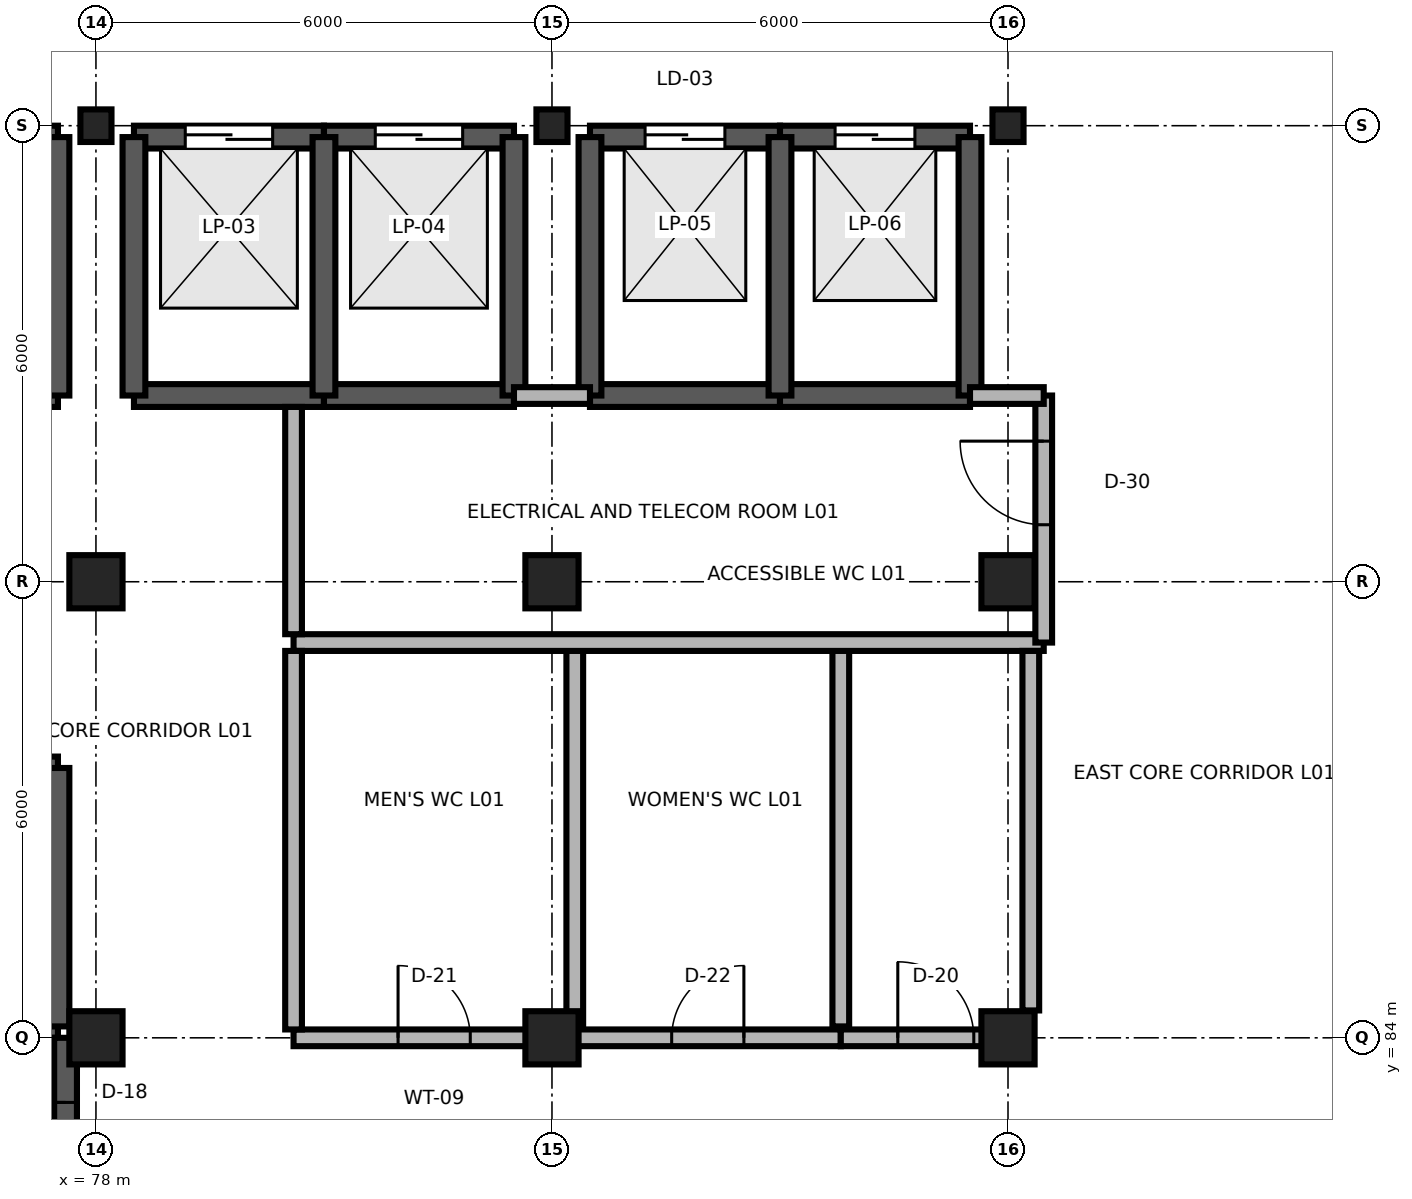
"""IFC4 building model, lengths in metres.
Left out: names, types, materials, properties, quantities, classifications, styles, units other than length and angle.
Written with IfcOpenShell. Run it as: python <this file> out.ifc"""

import sys

from ifc_helpers import new_model, si_unit, direction, frame, frame_2d, origin, origin_2d, place, context, subcontext, project, spatial, rectangle, i_section, extrude, element, fill, save


model = new_model("IFC4")
c1 = context("Model", 3, precision=1e-05, world=origin(), true_north=direction((0.0, 1.0)))
c2 = subcontext(c1, "Body", "Model", "MODEL_VIEW")
j1 = project(units=[si_unit("LENGTHUNIT", "METRE"), si_unit("PLANEANGLEUNIT", "RADIAN")], contexts=[c1])
p1 = place(None, origin())
s1 = spatial("IfcSite", under=j1, at=p1, CompositionType="ELEMENT")
p2 = place(p1, origin())
s2 = spatial("IfcBuilding", under=s1, at=p2, CompositionType="ELEMENT")
p3 = place(p2, origin())
s3 = spatial("IfcBuildingStorey", under=s2, at=p3, CompositionType="ELEMENT", Elevation=0.0)
for number, where, z_axis, x_axis in (
    (1, (78.0, 84.0, 0.0), (0.0, 0.0, 1.0), (1.0, 0.0, 0.0)),
    (2, (84.0, 84.0, 0.0), (0.0, 0.0, 1.0), (1.0, 0.0, 0.0)),
    (3, (90.0, 84.0, 0.0), (0.0, 0.0, 1.0), (1.0, 0.0, 0.0)),
    (4, (78.0, 90.0, 0.0), (0.0, 0.0, 1.0), (1.0, 0.0, 0.0)),
    (5, (84.0, 90.0, 0.0), (0.0, 0.0, 1.0), (1.0, 0.0, 0.0)),
    (6, (90.0, 90.0, 0.0), (0.0, 0.0, 1.0), (1.0, 0.0, 0.0)),
):
    element("IfcColumn", number, at=place(p3, frame(where, z_axis=z_axis, x_axis=x_axis)), inside=s3, PredefinedType="COLUMN", context=c2, shape_type="SweptSolid", body=[
        extrude(rectangle(XDim=0.7, YDim=0.7, at=origin_2d()), origin(), (0.0, 0.0, 1.0), 6.0),
    ])
for number, where, z_axis, x_axis in (
    (7, (78.0, 96.0, 0.0), (0.0, 0.0, 1.0), (1.0, 0.0, 0.0)),
    (8, (84.0, 96.0, 0.0), (0.0, 0.0, 1.0), (1.0, 0.0, 0.0)),
    (9, (90.0, 96.0, 0.0), (0.0, 0.0, 1.0), (1.0, 0.0, 0.0)),
):
    element("IfcColumn", number, at=place(p3, frame(where, z_axis=z_axis, x_axis=x_axis)), inside=s3, PredefinedType="COLUMN", context=c2, shape_type="SweptSolid", body=[
        extrude(i_section(OverallWidth=0.409, OverallDepth=0.429, WebThickness=0.024, FlangeThickness=0.035, FilletRadius=0.022, at=origin_2d()), origin(), (0.0, 0.0, 1.0), 6.0),
    ])
p4 = place(p3, frame((75.0, 84.15, 0.0), z_axis=(0.0, 0.0, 1.0), x_axis=(1.0, 0.0, 0.0)))
e10 = element("IfcWall", 10, at=p4, inside=s3, PredefinedType="SHEAR", context=c2, shape_type="SweptSolid", body=[
    extrude(rectangle(XDim=2.5, YDim=0.3, at=frame_2d((1.25, 0.0))), origin(), (0.0, 0.0, 1.0), 5.76),
])
p5 = place(p4, frame((0.7, 0.0, 0.0)))
e11 = element("IfcOpeningElement", 11, at=p5, cuts=e10, PredefinedType="OPENING", context=c2, shape_type="SweptSolid", body=[
    extrude(rectangle(XDim=1.1, YDim=2.1, at=frame_2d((0.55, 1.05))), frame((0.0, 0.165, 0.0), z_axis=(0.0, -1.0, 0.0), x_axis=(1.0, 0.0, 0.0)), (0.0, 0.0, 1.0), 0.33),
])
p6 = place(p3, frame((75.0, 87.55, 0.0), z_axis=(0.0, 0.0, 1.0), x_axis=(1.0, 0.0, 0.0)))
e12 = element("IfcWall", 12, at=p6, inside=s3, PredefinedType="SHEAR", context=c2, shape_type="SweptSolid", body=[
    extrude(rectangle(XDim=2.5, YDim=0.3, at=frame_2d((1.25, 0.0))), origin(), (0.0, 0.0, 1.0), 5.76),
])
p7 = place(p3, frame((77.5, 84.15, 0.0), z_axis=(0.0, 0.0, 1.0), x_axis=(0.0, 1.0, 0.0)))
e13 = element("IfcWall", 13, at=p7, inside=s3, PredefinedType="SHEAR", context=c2, shape_type="SweptSolid", body=[
    extrude(rectangle(XDim=3.4, YDim=0.3, at=frame_2d((1.7, 0.0))), origin(), (0.0, 0.0, 1.0), 5.76),
])
p8 = place(p3, frame((75.0, 95.85, 0.0), z_axis=(0.0, 0.0, 1.0), x_axis=(1.0, 0.0, 0.0)))
e14 = element("IfcWall", 14, at=p8, inside=s3, PredefinedType="SHEAR", context=c2, shape_type="SweptSolid", body=[
    extrude(rectangle(XDim=2.5, YDim=0.3, at=frame_2d((1.25, 0.0))), origin(), (0.0, 0.0, 1.0), 5.76),
])
p9 = place(p8, frame((0.675, 0.0, 0.0)))
e15 = element("IfcOpeningElement", 15, at=p9, cuts=e14, PredefinedType="OPENING", context=c2, shape_type="SweptSolid", body=[
    extrude(rectangle(XDim=1.15, YDim=2.15, at=frame_2d((0.575, 1.075))), frame((0.0, 0.165, 0.0), z_axis=(0.0, -1.0, 0.0), x_axis=(1.0, 0.0, 0.0)), (0.0, 0.0, 1.0), 0.33),
])
p10 = place(p3, frame((75.0, 92.45, 0.0), z_axis=(0.0, 0.0, 1.0), x_axis=(1.0, 0.0, 0.0)))
e16 = element("IfcWall", 16, at=p10, inside=s3, PredefinedType="SHEAR", context=c2, shape_type="SweptSolid", body=[
    extrude(rectangle(XDim=2.5, YDim=0.3, at=frame_2d((1.25, 0.0))), origin(), (0.0, 0.0, 1.0), 5.76),
])
p11 = place(p3, frame((77.5, 92.45, 0.0), z_axis=(0.0, 0.0, 1.0), x_axis=(0.0, 1.0, 0.0)))
e17 = element("IfcWall", 17, at=p11, inside=s3, PredefinedType="SHEAR", context=c2, shape_type="SweptSolid", body=[
    extrude(rectangle(XDim=3.4, YDim=0.3, at=frame_2d((1.7, 0.0))), origin(), (0.0, 0.0, 1.0), 5.76),
])
p12 = place(p3, frame((78.5, 95.85, 0.0), z_axis=(0.0, 0.0, 1.0), x_axis=(1.0, 0.0, 0.0)))
e18 = element("IfcWall", 18, at=p12, inside=s3, PredefinedType="SHEAR", context=c2, shape_type="SweptSolid", body=[
    extrude(rectangle(XDim=2.5, YDim=0.3, at=frame_2d((1.25, 0.0))), origin(), (0.0, 0.0, 1.0), 5.76),
])
p13 = place(p12, frame((0.675, 0.0, 0.0)))
e19 = element("IfcOpeningElement", 19, at=p13, cuts=e18, PredefinedType="OPENING", context=c2, shape_type="SweptSolid", body=[
    extrude(rectangle(XDim=1.15, YDim=2.15, at=frame_2d((0.575, 1.075))), frame((0.0, 0.165, 0.0), z_axis=(0.0, -1.0, 0.0), x_axis=(1.0, 0.0, 0.0)), (0.0, 0.0, 1.0), 0.33),
])
p14 = place(p3, frame((78.5, 92.45, 0.0), z_axis=(0.0, 0.0, 1.0), x_axis=(1.0, 0.0, 0.0)))
e20 = element("IfcWall", 20, at=p14, inside=s3, PredefinedType="SHEAR", context=c2, shape_type="SweptSolid", body=[
    extrude(rectangle(XDim=2.5, YDim=0.3, at=frame_2d((1.25, 0.0))), origin(), (0.0, 0.0, 1.0), 5.76),
])
p15 = place(p3, frame((78.5, 92.45, 0.0), z_axis=(0.0, 0.0, 1.0), x_axis=(0.0, 1.0, 0.0)))
e21 = element("IfcWall", 21, at=p15, inside=s3, PredefinedType="SHEAR", context=c2, shape_type="SweptSolid", body=[
    extrude(rectangle(XDim=3.4, YDim=0.3, at=frame_2d((1.7, 0.0))), origin(), (0.0, 0.0, 1.0), 5.76),
])
p16 = place(p3, frame((81.0, 95.85, 0.0), z_axis=(0.0, 0.0, 1.0), x_axis=(1.0, 0.0, 0.0)))
e22 = element("IfcWall", 22, at=p16, inside=s3, PredefinedType="SHEAR", context=c2, shape_type="SweptSolid", body=[
    extrude(rectangle(XDim=2.5, YDim=0.3, at=frame_2d((1.25, 0.0))), origin(), (0.0, 0.0, 1.0), 5.76),
])
p17 = place(p16, frame((0.675, 0.0, 0.0)))
e23 = element("IfcOpeningElement", 23, at=p17, cuts=e22, PredefinedType="OPENING", context=c2, shape_type="SweptSolid", body=[
    extrude(rectangle(XDim=1.15, YDim=2.15, at=frame_2d((0.575, 1.075))), frame((0.0, 0.165, 0.0), z_axis=(0.0, -1.0, 0.0), x_axis=(1.0, 0.0, 0.0)), (0.0, 0.0, 1.0), 0.33),
])
p18 = place(p3, frame((81.0, 92.45, 0.0), z_axis=(0.0, 0.0, 1.0), x_axis=(1.0, 0.0, 0.0)))
e24 = element("IfcWall", 24, at=p18, inside=s3, PredefinedType="SHEAR", context=c2, shape_type="SweptSolid", body=[
    extrude(rectangle(XDim=2.5, YDim=0.3, at=frame_2d((1.25, 0.0))), origin(), (0.0, 0.0, 1.0), 5.76),
])
for number, where, z_axis, x_axis in (
    (25, (81.0, 92.45, 0.0), (0.0, 0.0, 1.0), (0.0, 1.0, 0.0)),
    (26, (83.5, 92.45, 0.0), (0.0, 0.0, 1.0), (0.0, 1.0, 0.0)),
):
    element("IfcWall", number, at=place(p3, frame(where, z_axis=z_axis, x_axis=x_axis)), inside=s3, PredefinedType="SHEAR", context=c2, shape_type="SweptSolid", body=[
        extrude(rectangle(XDim=3.4, YDim=0.3, at=frame_2d((1.7, 0.0))), origin(), (0.0, 0.0, 1.0), 5.76),
    ])
p19 = place(p3, frame((84.5, 95.85, 0.0), z_axis=(0.0, 0.0, 1.0), x_axis=(1.0, 0.0, 0.0)))
e27 = element("IfcWall", 27, at=p19, inside=s3, PredefinedType="SHEAR", context=c2, shape_type="SweptSolid", body=[
    extrude(rectangle(XDim=2.5, YDim=0.3, at=frame_2d((1.25, 0.0))), origin(), (0.0, 0.0, 1.0), 5.76),
])
p20 = place(p19, frame((0.725, 0.0, 0.0)))
e28 = element("IfcOpeningElement", 28, at=p20, cuts=e27, PredefinedType="OPENING", context=c2, shape_type="SweptSolid", body=[
    extrude(rectangle(XDim=1.05, YDim=2.1, at=frame_2d((0.525, 1.05))), frame((0.0, 0.165, 0.0), z_axis=(0.0, -1.0, 0.0), x_axis=(1.0, 0.0, 0.0)), (0.0, 0.0, 1.0), 0.33),
])
p21 = place(p3, frame((84.5, 92.45, 0.0), z_axis=(0.0, 0.0, 1.0), x_axis=(1.0, 0.0, 0.0)))
e29 = element("IfcWall", 29, at=p21, inside=s3, PredefinedType="SHEAR", context=c2, shape_type="SweptSolid", body=[
    extrude(rectangle(XDim=2.5, YDim=0.3, at=frame_2d((1.25, 0.0))), origin(), (0.0, 0.0, 1.0), 5.76),
])
p22 = place(p3, frame((84.5, 92.45, 0.0), z_axis=(0.0, 0.0, 1.0), x_axis=(0.0, 1.0, 0.0)))
e30 = element("IfcWall", 30, at=p22, inside=s3, PredefinedType="SHEAR", context=c2, shape_type="SweptSolid", body=[
    extrude(rectangle(XDim=3.4, YDim=0.3, at=frame_2d((1.7, 0.0))), origin(), (0.0, 0.0, 1.0), 5.76),
])
p23 = place(p3, frame((87.0, 95.85, 0.0), z_axis=(0.0, 0.0, 1.0), x_axis=(1.0, 0.0, 0.0)))
e31 = element("IfcWall", 31, at=p23, inside=s3, PredefinedType="SHEAR", context=c2, shape_type="SweptSolid", body=[
    extrude(rectangle(XDim=2.5, YDim=0.3, at=frame_2d((1.25, 0.0))), origin(), (0.0, 0.0, 1.0), 5.76),
])
p24 = place(p23, frame((0.725, 0.0, 0.0)))
e32 = element("IfcOpeningElement", 32, at=p24, cuts=e31, PredefinedType="OPENING", context=c2, shape_type="SweptSolid", body=[
    extrude(rectangle(XDim=1.05, YDim=2.1, at=frame_2d((0.525, 1.05))), frame((0.0, 0.165, 0.0), z_axis=(0.0, -1.0, 0.0), x_axis=(1.0, 0.0, 0.0)), (0.0, 0.0, 1.0), 0.33),
])
p25 = place(p3, frame((87.0, 92.45, 0.0), z_axis=(0.0, 0.0, 1.0), x_axis=(1.0, 0.0, 0.0)))
e33 = element("IfcWall", 33, at=p25, inside=s3, PredefinedType="SHEAR", context=c2, shape_type="SweptSolid", body=[
    extrude(rectangle(XDim=2.5, YDim=0.3, at=frame_2d((1.25, 0.0))), origin(), (0.0, 0.0, 1.0), 5.76),
])
for number, where, z_axis, x_axis in (
    (34, (87.0, 92.45, 0.0), (0.0, 0.0, 1.0), (0.0, 1.0, 0.0)),
    (35, (89.5, 92.45, 0.0), (0.0, 0.0, 1.0), (0.0, 1.0, 0.0)),
):
    element("IfcWall", number, at=place(p3, frame(where, z_axis=z_axis, x_axis=x_axis)), inside=s3, PredefinedType="SHEAR", context=c2, shape_type="SweptSolid", body=[
        extrude(rectangle(XDim=3.4, YDim=0.3, at=frame_2d((1.7, 0.0))), origin(), (0.0, 0.0, 1.0), 5.76),
    ])
p26 = place(p3, frame((77.6, 81.0, 0.0), z_axis=(0.0, 0.0, 1.0), x_axis=(0.0, 1.0, 0.0)))
e36 = element("IfcWall", 36, at=p26, inside=s3, PredefinedType="SHEAR", context=c2, shape_type="SweptSolid", body=[
    extrude(rectangle(XDim=3.0, YDim=0.3, at=frame_2d((1.5, 0.0))), origin(), (0.0, 0.0, 1.0), 5.76),
])
p27 = place(p26, frame((0.85, 0.0, 0.0)))
e37 = element("IfcOpeningElement", 37, at=p27, cuts=e36, PredefinedType="OPENING", context=c2, shape_type="SweptSolid", body=[
    extrude(rectangle(XDim=1.3, YDim=2.2, at=frame_2d((0.65, 1.1))), frame((0.0, 0.165, 0.0), z_axis=(0.0, -1.0, 0.0), x_axis=(1.0, 0.0, 0.0)), (0.0, 0.0, 1.0), 0.33),
])
p28 = place(p3, frame((80.6, 84.0, 0.0), z_axis=(0.0, 0.0, 1.0), x_axis=(1.0, 0.0, 0.0)))
e38 = element("IfcWall", 38, at=p28, inside=s3, PredefinedType="PARTITIONING", context=c2, shape_type="SweptSolid", body=[
    extrude(rectangle(XDim=3.7, YDim=0.22, at=frame_2d((1.85, 0.0))), origin(), (0.0, 0.0, 1.0), 5.32),
])
p29 = place(p28, frame((1.375, 0.0, 0.0)))
e39 = element("IfcOpeningElement", 39, at=p29, cuts=e38, PredefinedType="OPENING", context=c2, shape_type="SweptSolid", body=[
    extrude(rectangle(XDim=0.95, YDim=2.15, at=frame_2d((0.475, 1.075))), frame((0.0, 0.125, 0.0), z_axis=(0.0, -1.0, 0.0), x_axis=(1.0, 0.0, 0.0)), (0.0, 0.0, 1.0), 0.25),
])
p30 = place(p3, frame((84.3, 84.0, 0.0), z_axis=(0.0, 0.0, 1.0), x_axis=(1.0, 0.0, 0.0)))
e40 = element("IfcWall", 40, at=p30, inside=s3, PredefinedType="PARTITIONING", context=c2, shape_type="SweptSolid", body=[
    extrude(rectangle(XDim=3.5, YDim=0.22, at=frame_2d((1.75, 0.0))), origin(), (0.0, 0.0, 1.0), 5.32),
])
p31 = place(p30, frame((1.275, 0.0, 0.0)))
e41 = element("IfcOpeningElement", 41, at=p31, cuts=e40, PredefinedType="OPENING", context=c2, shape_type="SweptSolid", body=[
    extrude(rectangle(XDim=0.95, YDim=2.1, at=frame_2d((0.475, 1.05))), frame((0.0, 0.125, 0.0), z_axis=(0.0, -1.0, 0.0), x_axis=(1.0, 0.0, 0.0)), (0.0, 0.0, 1.0), 0.25),
])
p32 = place(p3, frame((87.8, 84.0, 0.0), z_axis=(0.0, 0.0, 1.0), x_axis=(1.0, 0.0, 0.0)))
e42 = element("IfcWall", 42, at=p32, inside=s3, PredefinedType="PARTITIONING", context=c2, shape_type="SweptSolid", body=[
    extrude(rectangle(XDim=2.5, YDim=0.22, at=frame_2d((1.25, 0.0))), origin(), (0.0, 0.0, 1.0), 5.32),
])
p33 = place(p32, frame((0.75, 0.0, 0.0)))
e43 = element("IfcOpeningElement", 43, at=p33, cuts=e42, PredefinedType="OPENING", context=c2, shape_type="SweptSolid", body=[
    extrude(rectangle(XDim=1.0, YDim=2.15, at=frame_2d((0.5, 1.075))), frame((0.0, 0.125, 0.0), z_axis=(0.0, -1.0, 0.0), x_axis=(1.0, 0.0, 0.0)), (0.0, 0.0, 1.0), 0.25),
])
for number, where, z_axis, x_axis in (
    (44, (84.3, 84.15, 0.0), (0.0, 0.0, 1.0), (0.0, 1.0, 0.0)),
    (45, (87.8, 84.15, 0.0), (0.0, 0.0, 1.0), (0.0, 1.0, 0.0)),
):
    element("IfcWall", number, at=place(p3, frame(where, z_axis=z_axis, x_axis=x_axis)), inside=s3, PredefinedType="PARTITIONING", context=c2, shape_type="SweptSolid", body=[
        extrude(rectangle(XDim=5.0, YDim=0.22, at=frame_2d((2.5, 0.0))), origin(), (0.0, 0.0, 1.0), 5.76),
    ])
p34 = place(p3, frame((80.6, 89.2, 0.0), z_axis=(0.0, 0.0, 1.0), x_axis=(1.0, 0.0, 0.0)))
e46 = element("IfcWall", 46, at=p34, inside=s3, PredefinedType="PARTITIONING", context=c2, shape_type="SweptSolid", body=[
    extrude(rectangle(XDim=9.87, YDim=0.22, at=frame_2d((4.935, 0.0))), origin(), (0.0, 0.0, 1.0), 5.76),
])
p35 = place(p3, frame((90.47, 89.2, 0.0), z_axis=(0.0, 0.0, 1.0), x_axis=(0.0, 1.0, 0.0)))
e47 = element("IfcWall", 47, at=p35, inside=s3, PredefinedType="PARTITIONING", context=c2, shape_type="SweptSolid", body=[
    extrude(rectangle(XDim=3.25, YDim=0.22, at=frame_2d((1.625, 0.0))), origin(), (0.0, 0.0, 1.0), 5.76),
])
p36 = place(p35, frame((1.55, 0.0, 0.0)))
e48 = element("IfcOpeningElement", 48, at=p36, cuts=e47, PredefinedType="OPENING", context=c2, shape_type="SweptSolid", body=[
    extrude(rectangle(XDim=1.1, YDim=2.15, at=frame_2d((0.55, 1.075))), frame((0.0, 0.125, 0.0), z_axis=(0.0, -1.0, 0.0), x_axis=(1.0, 0.0, 0.0)), (0.0, 0.0, 1.0), 0.25),
])
p37 = place(p3, frame((80.6, 84.11, 0.0), z_axis=(0.0, 0.0, 1.0), x_axis=(0.0, 1.0, 0.0)))
e49 = element("IfcWall", 49, at=p37, inside=s3, PredefinedType="PARTITIONING", context=c2, shape_type="SweptSolid", body=[
    extrude(rectangle(XDim=4.98, YDim=0.22, at=frame_2d((2.49, 0.0))), origin(), (0.0, 0.0, 1.0), 5.76),
])
p38 = place(p3, frame((90.3, 84.36, 0.0), z_axis=(0.0, 0.0, 1.0), x_axis=(0.0, 1.0, 0.0)))
e50 = element("IfcWall", 50, at=p38, inside=s3, PredefinedType="PARTITIONING", context=c2, shape_type="SweptSolid", body=[
    extrude(rectangle(XDim=4.73, YDim=0.22, at=frame_2d((2.365, 0.0))), origin(), (0.0, 0.0, 1.0), 5.76),
])
p39 = place(p3, frame((80.6, 89.31, 0.0), z_axis=(0.0, 0.0, 1.0), x_axis=(0.0, 1.0, 0.0)))
e51 = element("IfcWall", 51, at=p39, inside=s3, PredefinedType="PARTITIONING", context=c2, shape_type="SweptSolid", body=[
    extrude(rectangle(XDim=2.99, YDim=0.22, at=frame_2d((1.495, 0.0))), origin(), (0.0, 0.0, 1.0), 5.76),
])
p40 = place(p3, frame((83.5, 92.45, 0.0), z_axis=(0.0, 0.0, 1.0), x_axis=(1.0, 0.0, 0.0)))
e52 = element("IfcWall", 52, at=p40, inside=s3, PredefinedType="PARTITIONING", context=c2, shape_type="SweptSolid", body=[
    extrude(rectangle(XDim=1.0, YDim=0.22, at=frame_2d((0.5, 0.0))), origin(), (0.0, 0.0, 1.0), 5.76),
])
p41 = place(p3, frame((89.5, 92.45, 0.0), z_axis=(0.0, 0.0, 1.0), x_axis=(1.0, 0.0, 0.0)))
e53 = element("IfcWall", 53, at=p41, inside=s3, PredefinedType="PARTITIONING", context=c2, shape_type="SweptSolid", body=[
    extrude(rectangle(XDim=0.97, YDim=0.22, at=frame_2d((0.485, 0.0))), origin(), (0.0, 0.0, 1.0), 5.76),
])
p42 = place(p13, origin())
e54 = element("IfcDoor", 54, at=p42, inside=s3, OperationType="DOUBLE_DOOR_SLIDING", PredefinedType="DOOR", context=c2, shape_type="SweptSolid", body=[
    extrude(rectangle(XDim=1.15, YDim=2.15, at=frame_2d((0.575, 1.075))), frame((0.0, 0.025, 0.0), z_axis=(0.0, -1.0, 0.0), x_axis=(1.0, 0.0, 0.0)), (0.0, 0.0, 1.0), 0.05),
])
fill(e19, e54)
p43 = place(p17, origin())
e55 = element("IfcDoor", 55, at=p43, inside=s3, OperationType="DOUBLE_DOOR_SLIDING", PredefinedType="DOOR", context=c2, shape_type="SweptSolid", body=[
    extrude(rectangle(XDim=1.15, YDim=2.15, at=frame_2d((0.575, 1.075))), frame((0.0, 0.025, 0.0), z_axis=(0.0, -1.0, 0.0), x_axis=(1.0, 0.0, 0.0)), (0.0, 0.0, 1.0), 0.05),
])
fill(e23, e55)
p44 = place(p20, origin())
e56 = element("IfcDoor", 56, at=p44, inside=s3, OperationType="DOUBLE_DOOR_SLIDING", PredefinedType="DOOR", context=c2, shape_type="SweptSolid", body=[
    extrude(rectangle(XDim=1.05, YDim=2.1, at=frame_2d((0.525, 1.05))), frame((0.0, 0.025, 0.0), z_axis=(0.0, -1.0, 0.0), x_axis=(1.0, 0.0, 0.0)), (0.0, 0.0, 1.0), 0.05),
])
fill(e28, e56)
p45 = place(p24, origin())
e57 = element("IfcDoor", 57, at=p45, inside=s3, OperationType="DOUBLE_DOOR_SLIDING", PredefinedType="DOOR", context=c2, shape_type="SweptSolid", body=[
    extrude(rectangle(XDim=1.05, YDim=2.1, at=frame_2d((0.525, 1.05))), frame((0.0, 0.025, 0.0), z_axis=(0.0, -1.0, 0.0), x_axis=(1.0, 0.0, 0.0)), (0.0, 0.0, 1.0), 0.05),
])
fill(e32, e57)
p46 = place(p27, origin())
e58 = element("IfcDoor", 58, at=p46, inside=s3, OperationType="SINGLE_SWING_RIGHT", PredefinedType="DOOR", context=c2, shape_type="SweptSolid", body=[
    extrude(rectangle(XDim=1.3, YDim=2.2, at=frame_2d((0.65, 1.1))), frame((0.0, 0.025, 0.0), z_axis=(0.0, -1.0, 0.0), x_axis=(1.0, 0.0, 0.0)), (0.0, 0.0, 1.0), 0.05),
])
fill(e37, e58)
p47 = place(p29, origin())
e59 = element("IfcDoor", 59, at=p47, inside=s3, OperationType="SINGLE_SWING_LEFT", PredefinedType="DOOR", context=c2, shape_type="SweptSolid", body=[
    extrude(rectangle(XDim=0.95, YDim=2.15, at=frame_2d((0.475, 1.075))), frame((0.0, 0.025, 0.0), z_axis=(0.0, -1.0, 0.0), x_axis=(1.0, 0.0, 0.0)), (0.0, 0.0, 1.0), 0.05),
])
fill(e39, e59)
p48 = place(p31, origin())
e60 = element("IfcDoor", 60, at=p48, inside=s3, OperationType="SINGLE_SWING_RIGHT", PredefinedType="DOOR", context=c2, shape_type="SweptSolid", body=[
    extrude(rectangle(XDim=0.95, YDim=2.1, at=frame_2d((0.475, 1.05))), frame((0.0, 0.025, 0.0), z_axis=(0.0, -1.0, 0.0), x_axis=(1.0, 0.0, 0.0)), (0.0, 0.0, 1.0), 0.05),
])
fill(e41, e60)
p49 = place(p33, origin())
e61 = element("IfcDoor", 61, at=p49, inside=s3, OperationType="SINGLE_SWING_LEFT", PredefinedType="DOOR", context=c2, shape_type="SweptSolid", body=[
    extrude(rectangle(XDim=1.0, YDim=2.15, at=frame_2d((0.5, 1.075))), frame((0.0, 0.025, 0.0), z_axis=(0.0, -1.0, 0.0), x_axis=(1.0, 0.0, 0.0)), (0.0, 0.0, 1.0), 0.05),
])
fill(e43, e61)
p50 = place(p36, origin())
e62 = element("IfcDoor", 62, at=p50, inside=s3, OperationType="SINGLE_SWING_RIGHT", PredefinedType="DOOR", context=c2, shape_type="SweptSolid", body=[
    extrude(rectangle(XDim=1.1, YDim=2.15, at=frame_2d((0.55, 1.075))), frame((0.0, 0.025, 0.0), z_axis=(0.0, -1.0, 0.0), x_axis=(1.0, 0.0, 0.0)), (0.0, 0.0, 1.0), 0.05),
])
fill(e48, e62)
save(model, sys.argv[1])
